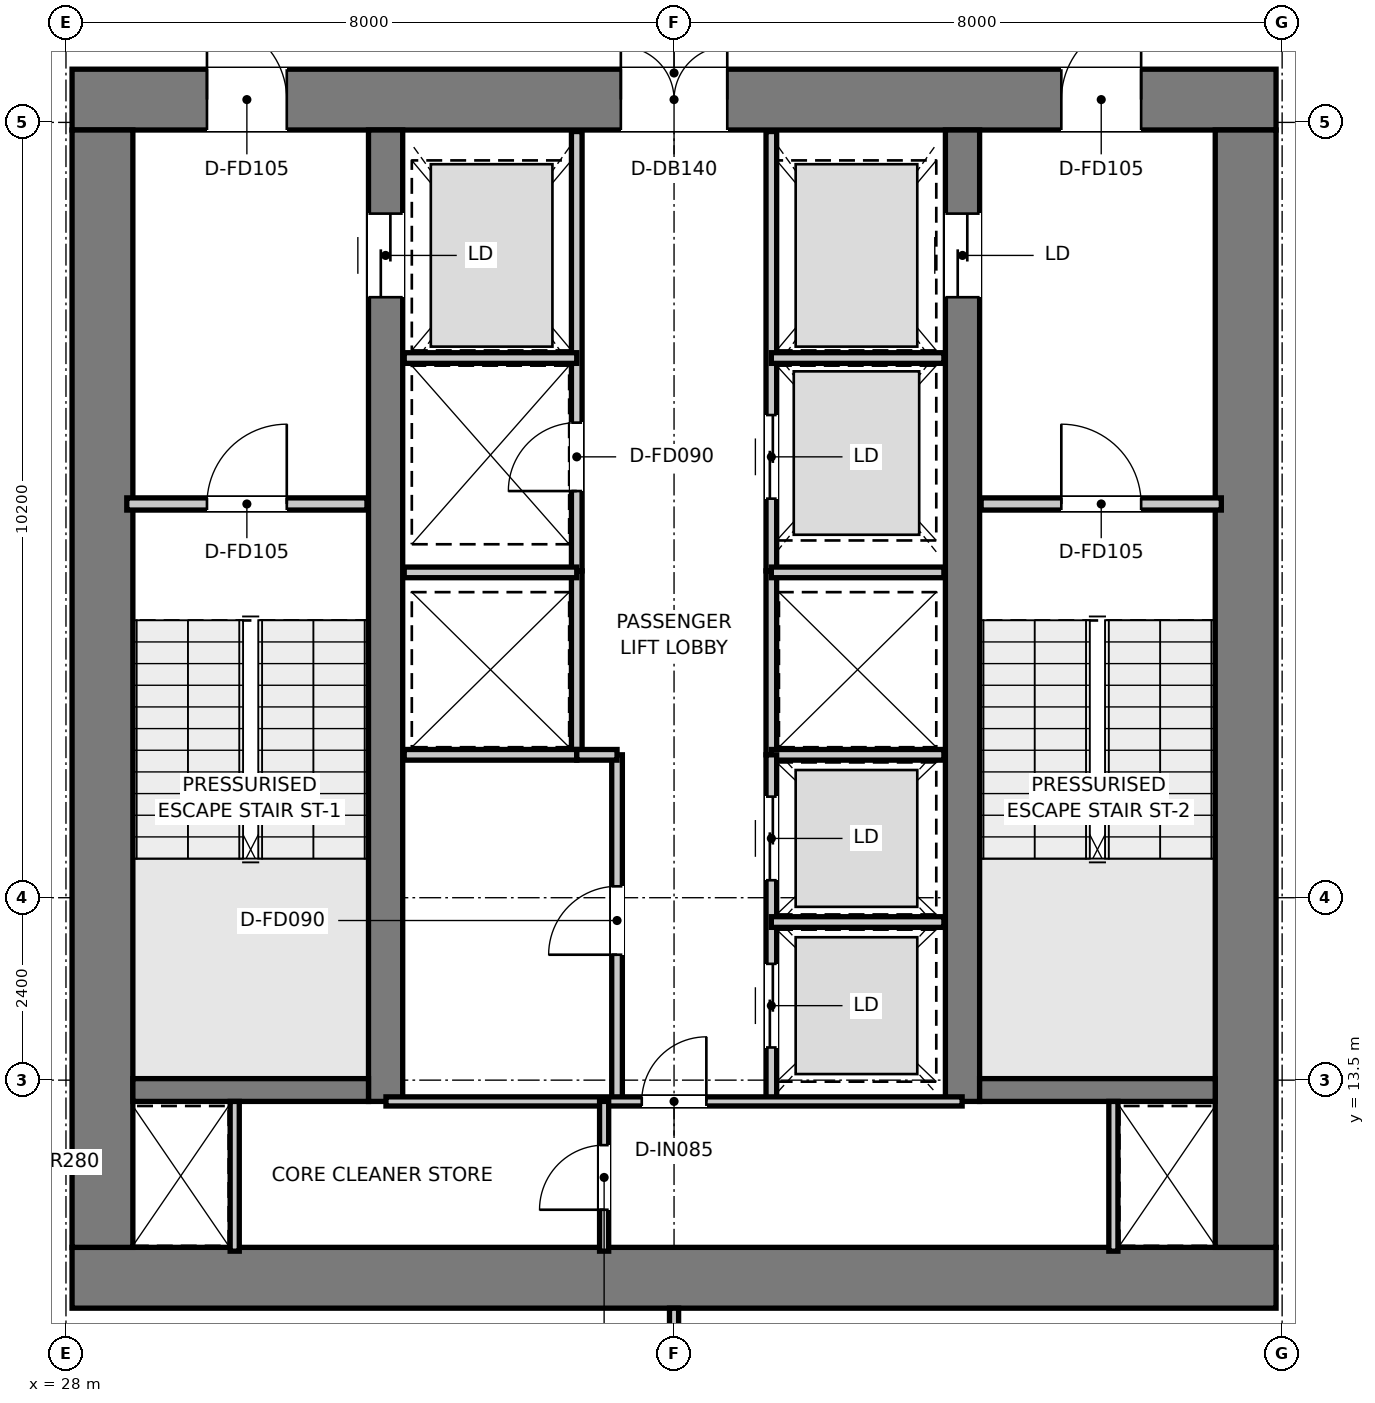
"""IFC4 building model, lengths in metres.
Left out: names, types, materials, properties, quantities, classifications, styles, units other than length and angle.
Written with IfcOpenShell. Run it as: python <this file> out.ifc"""

import sys

from ifc_helpers import new_model, si_unit, direction, frame, frame_2d, origin, place, context, subcontext, project, spatial, rectangle, extrude, element, fill, save


model = new_model("IFC4")
c1 = context("Model", 3, precision=1e-05, world=origin(), true_north=direction((0.0, 1.0)))
c2 = subcontext(c1, "Body", "Model", "MODEL_VIEW")
j1 = project(units=[si_unit("LENGTHUNIT", "METRE"), si_unit("PLANEANGLEUNIT", "RADIAN")], contexts=[c1])
p1 = place(None, origin())
s1 = spatial("IfcSite", under=j1, at=p1, CompositionType="ELEMENT")
p2 = place(p1, origin())
s2 = spatial("IfcBuilding", under=s1, at=p2, CompositionType="ELEMENT")
p3 = place(p2, frame((0.0, 0.0, 193.6)))
s3 = spatial("IfcBuildingStorey", under=s2, at=p3, CompositionType="ELEMENT", Elevation=193.6)
p4 = place(p3, frame((28.08, 10.9, 0.0), z_axis=(0.0, 0.0, 1.0), x_axis=(1.0, 0.0, 0.0)))
e1 = element("IfcWall", 1, at=p4, inside=s3, PredefinedType="SHEAR", context=c2, shape_type="SweptSolid", body=[
    extrude(rectangle(XDim=15.84, YDim=0.8, at=frame_2d((7.92, 0.0))), origin(), (0.0, 0.0, 1.0), 3.95),
])
p5 = place(p3, frame((28.08, 26.4, 0.0), z_axis=(0.0, 0.0, 1.0), x_axis=(1.0, 0.0, 0.0)))
e2 = element("IfcWall", 2, at=p5, inside=s3, PredefinedType="SHEAR", context=c2, shape_type="SweptSolid", body=[
    extrude(rectangle(XDim=15.84, YDim=0.8, at=frame_2d((7.92, 0.0))), origin(), (0.0, 0.0, 1.0), 3.95),
])
p6 = place(p5, frame((7.22, 0.0, 0.0)))
e3 = element("IfcOpeningElement", 3, at=p6, cuts=e2, PredefinedType="OPENING", context=c2, shape_type="SweptSolid", body=[
    extrude(rectangle(XDim=1.4, YDim=2.2, at=frame_2d((0.7, 1.1))), frame((0.0, 0.41, 0.0), z_axis=(0.0, -1.0, 0.0), x_axis=(1.0, 0.0, 0.0)), (0.0, 0.0, 1.0), 0.82),
])
p7 = place(p5, frame((1.775, 0.0, 0.0)))
e4 = element("IfcOpeningElement", 4, at=p7, cuts=e2, PredefinedType="OPENING", context=c2, shape_type="SweptSolid", body=[
    extrude(rectangle(XDim=1.05, YDim=2.1, at=frame_2d((0.525, 1.05))), frame((0.0, 0.41, 0.0), z_axis=(0.0, -1.0, 0.0), x_axis=(1.0, 0.0, 0.0)), (0.0, 0.0, 1.0), 0.82),
])
p8 = place(p5, frame((13.015, 0.0, 0.0)))
e5 = element("IfcOpeningElement", 5, at=p8, cuts=e2, PredefinedType="OPENING", context=c2, shape_type="SweptSolid", body=[
    extrude(rectangle(XDim=1.05, YDim=2.1, at=frame_2d((0.525, 1.05))), frame((0.0, 0.41, 0.0), z_axis=(0.0, -1.0, 0.0), x_axis=(1.0, 0.0, 0.0)), (0.0, 0.0, 1.0), 0.82),
])
for number, where, z_axis, x_axis in (
    (6, (28.48, 11.3, 0.0), (0.0, 0.0, 1.0), (0.0, 1.0, 0.0)),
    (7, (43.52, 11.3, 0.0), (0.0, 0.0, 1.0), (0.0, 1.0, 0.0)),
):
    element("IfcWall", number, at=place(p3, frame(where, z_axis=z_axis, x_axis=x_axis)), inside=s3, PredefinedType="SHEAR", context=c2, shape_type="SweptSolid", body=[
        extrude(rectangle(XDim=14.7, YDim=0.8, at=frame_2d((7.35, 0.0))), origin(), (0.0, 0.0, 1.0), 3.95),
    ])
p9 = place(p3, frame((32.205, 13.22, 0.0), z_axis=(0.0, 0.0, 1.0), x_axis=(0.0, 1.0, 0.0)))
e8 = element("IfcWall", 8, at=p9, inside=s3, PredefinedType="SHEAR", context=c2, shape_type="SweptSolid", body=[
    extrude(rectangle(XDim=12.78, YDim=0.45, at=frame_2d((6.39, 0.0))), origin(), (0.0, 0.0, 1.0), 3.95),
])
p10 = place(p9, frame((10.58, 0.0, 0.0)))
e9 = element("IfcOpeningElement", 9, at=p10, cuts=e8, PredefinedType="OPENING", context=c2, shape_type="SweptSolid", body=[
    extrude(rectangle(XDim=1.1, YDim=2.15, at=frame_2d((0.55, 1.075))), frame((0.0, 0.235, 0.0), z_axis=(0.0, -1.0, 0.0), x_axis=(1.0, 0.0, 0.0)), (0.0, 0.0, 1.0), 0.47),
])
p11 = place(p3, frame((39.795, 13.22, 0.0), z_axis=(0.0, 0.0, 1.0), x_axis=(0.0, 1.0, 0.0)))
e10 = element("IfcWall", 10, at=p11, inside=s3, PredefinedType="SHEAR", context=c2, shape_type="SweptSolid", body=[
    extrude(rectangle(XDim=12.78, YDim=0.45, at=frame_2d((6.39, 0.0))), origin(), (0.0, 0.0, 1.0), 3.95),
])
p12 = place(p11, frame((10.58, 0.0, 0.0)))
e11 = element("IfcOpeningElement", 11, at=p12, cuts=e10, PredefinedType="OPENING", context=c2, shape_type="SweptSolid", body=[
    extrude(rectangle(XDim=1.1, YDim=2.15, at=frame_2d((0.55, 1.075))), frame((0.0, 0.235, 0.0), z_axis=(0.0, -1.0, 0.0), x_axis=(1.0, 0.0, 0.0)), (0.0, 0.0, 1.0), 0.47),
])
for number, where, z_axis, x_axis in (
    (12, (28.88, 13.37, 0.0), (0.0, 0.0, 1.0), (1.0, 0.0, 0.0)),
    (13, (40.02, 13.37, 0.0), (0.0, 0.0, 1.0), (1.0, 0.0, 0.0)),
):
    element("IfcWall", number, at=place(p3, frame(where, z_axis=z_axis, x_axis=x_axis)), inside=s3, PredefinedType="SHEAR", context=c2, shape_type="SweptSolid", body=[
        extrude(rectangle(XDim=3.1, YDim=0.3, at=frame_2d((1.55, 0.0))), origin(), (0.0, 0.0, 1.0), 3.95),
    ])
p13 = place(p3, frame((28.8, 21.08, 0.0), z_axis=(0.0, 0.0, 1.0), x_axis=(1.0, 0.0, 0.0)))
e14 = element("IfcWall", 14, at=p13, inside=s3, PredefinedType="PARTITIONING", context=c2, shape_type="SweptSolid", body=[
    extrude(rectangle(XDim=3.16, YDim=0.16, at=frame_2d((1.58, 0.0))), origin(), (0.0, 0.0, 1.0), 3.67),
])
p14 = place(p13, frame((1.055, 0.0, 0.0)))
e15 = element("IfcOpeningElement", 15, at=p14, cuts=e14, PredefinedType="OPENING", context=c2, shape_type="SweptSolid", body=[
    extrude(rectangle(XDim=1.05, YDim=2.1, at=frame_2d((0.525, 1.05))), frame((0.0, 0.09, 0.0), z_axis=(0.0, -1.0, 0.0), x_axis=(1.0, 0.0, 0.0)), (0.0, 0.0, 1.0), 0.18),
])
p15 = place(p3, frame((40.04, 21.08, 0.0), z_axis=(0.0, 0.0, 1.0), x_axis=(1.0, 0.0, 0.0)))
e16 = element("IfcWall", 16, at=p15, inside=s3, PredefinedType="PARTITIONING", context=c2, shape_type="SweptSolid", body=[
    extrude(rectangle(XDim=3.16, YDim=0.16, at=frame_2d((1.58, 0.0))), origin(), (0.0, 0.0, 1.0), 3.67),
])
p16 = place(p15, frame((1.055, 0.0, 0.0)))
e17 = element("IfcOpeningElement", 17, at=p16, cuts=e16, PredefinedType="OPENING", context=c2, shape_type="SweptSolid", body=[
    extrude(rectangle(XDim=1.05, YDim=2.1, at=frame_2d((0.525, 1.05))), frame((0.0, 0.09, 0.0), z_axis=(0.0, -1.0, 0.0), x_axis=(1.0, 0.0, 0.0)), (0.0, 0.0, 1.0), 0.18),
])
p17 = place(p3, frame((34.72, 20.2, 0.0), z_axis=(0.0, 0.0, 1.0), x_axis=(0.0, 1.0, 0.0)))
e18 = element("IfcWall", 18, at=p17, inside=s3, PredefinedType="PARTITIONING", context=c2, shape_type="SweptSolid", body=[
    extrude(rectangle(XDim=5.78, YDim=0.14, at=frame_2d((2.89, 0.0))), origin(), (0.0, 0.0, 1.0), 2.67),
])
p18 = place(p17, frame((1.05, 0.0, 0.0)))
e19 = element("IfcOpeningElement", 19, at=p18, cuts=e18, PredefinedType="OPENING", context=c2, shape_type="SweptSolid", body=[
    extrude(rectangle(XDim=0.9, YDim=2.1, at=frame_2d((0.45, 1.05))), frame((0.0, 0.08, 0.0), z_axis=(0.0, -1.0, 0.0), x_axis=(1.0, 0.0, 0.0)), (0.0, 0.0, 1.0), 0.16),
])
p19 = place(p3, frame((37.28, 20.2, 0.0), z_axis=(0.0, 0.0, 1.0), x_axis=(0.0, 1.0, 0.0)))
e20 = element("IfcWall", 20, at=p19, inside=s3, PredefinedType="PARTITIONING", context=c2, shape_type="SweptSolid", body=[
    extrude(rectangle(XDim=5.78, YDim=0.14, at=frame_2d((2.89, 0.0))), origin(), (0.0, 0.0, 1.0), 2.67),
])
p20 = place(p19, frame((0.95, 0.0, 0.0)))
e21 = element("IfcOpeningElement", 21, at=p20, cuts=e20, PredefinedType="OPENING", context=c2, shape_type="SweptSolid", body=[
    extrude(rectangle(XDim=1.1, YDim=2.15, at=frame_2d((0.55, 1.075))), frame((0.0, 0.08, 0.0), z_axis=(0.0, -1.0, 0.0), x_axis=(1.0, 0.0, 0.0)), (0.0, 0.0, 1.0), 0.16),
])
for number, where, z_axis, x_axis in (
    (22, (32.45, 23.0, 0.0), (0.0, 0.0, 1.0), (1.0, 0.0, 0.0)),
    (23, (37.28, 23.0, 0.0), (0.0, 0.0, 1.0), (1.0, 0.0, 0.0)),
):
    element("IfcWall", number, at=place(p3, frame(where, z_axis=z_axis, x_axis=x_axis)), inside=s3, PredefinedType="PARTITIONING", context=c2, shape_type="SweptSolid", body=[
        extrude(rectangle(XDim=2.27, YDim=0.14, at=frame_2d((1.135, 0.0))), origin(), (0.0, 0.0, 1.0), 2.67),
    ])
for number, where, z_axis, x_axis in (
    (24, (34.72, 17.78, 0.0), (0.0, 0.0, 1.0), (0.0, 1.0, 0.0)),
    (25, (37.28, 17.78, 0.0), (0.0, 0.0, 1.0), (0.0, 1.0, 0.0)),
):
    element("IfcWall", number, at=place(p3, frame(where, z_axis=z_axis, x_axis=x_axis)), inside=s3, PredefinedType="PARTITIONING", context=c2, shape_type="SweptSolid", body=[
        extrude(rectangle(XDim=2.42, YDim=0.14, at=frame_2d((1.21, 0.0))), origin(), (0.0, 0.0, 1.0), 3.67),
    ])
for number, where, z_axis, x_axis in (
    (26, (32.45, 17.78, 0.0), (0.0, 0.0, 1.0), (1.0, 0.0, 0.0)),
    (27, (32.45, 20.18, 0.0), (0.0, 0.0, 1.0), (1.0, 0.0, 0.0)),
    (28, (37.28, 17.78, 0.0), (0.0, 0.0, 1.0), (1.0, 0.0, 0.0)),
    (29, (37.28, 20.18, 0.0), (0.0, 0.0, 1.0), (1.0, 0.0, 0.0)),
):
    element("IfcWall", number, at=place(p3, frame(where, z_axis=z_axis, x_axis=x_axis)), inside=s3, PredefinedType="PARTITIONING", context=c2, shape_type="SweptSolid", body=[
        extrude(rectangle(XDim=2.27, YDim=0.14, at=frame_2d((1.135, 0.0))), origin(), (0.0, 0.0, 1.0), 3.67),
    ])
p21 = place(p3, frame((35.25, 13.22, 0.0), z_axis=(0.0, 0.0, 1.0), x_axis=(0.0, 1.0, 0.0)))
e30 = element("IfcWall", 30, at=p21, inside=s3, PredefinedType="PARTITIONING", context=c2, shape_type="SweptSolid", body=[
    extrude(rectangle(XDim=4.56, YDim=0.14, at=frame_2d((2.28, 0.0))), origin(), (0.0, 0.0, 1.0), 3.67),
])
p22 = place(p21, frame((1.93, 0.0, 0.0)))
e31 = element("IfcOpeningElement", 31, at=p22, cuts=e30, PredefinedType="OPENING", context=c2, shape_type="SweptSolid", body=[
    extrude(rectangle(XDim=0.9, YDim=2.1, at=frame_2d((0.45, 1.05))), frame((0.0, 0.08, 0.0), z_axis=(0.0, -1.0, 0.0), x_axis=(1.0, 0.0, 0.0)), (0.0, 0.0, 1.0), 0.16),
])
p23 = place(p3, frame((34.72, 17.78, 0.0), z_axis=(0.0, 0.0, 1.0), x_axis=(1.0, 0.0, 0.0)))
e32 = element("IfcWall", 32, at=p23, inside=s3, PredefinedType="PARTITIONING", context=c2, shape_type="SweptSolid", body=[
    extrude(rectangle(XDim=0.53, YDim=0.14, at=frame_2d((0.265, 0.0))), origin(), (0.0, 0.0, 1.0), 3.67),
])
p24 = place(p3, frame((37.28, 13.22, 0.0), z_axis=(0.0, 0.0, 1.0), x_axis=(0.0, 1.0, 0.0)))
e33 = element("IfcWall", 33, at=p24, inside=s3, PredefinedType="PARTITIONING", context=c2, shape_type="SweptSolid", body=[
    extrude(rectangle(XDim=4.56, YDim=0.14, at=frame_2d((2.28, 0.0))), origin(), (0.0, 0.0, 1.0), 3.67),
])
p25 = place(p24, frame((0.71, 0.0, 0.0)))
e34 = element("IfcOpeningElement", 34, at=p25, cuts=e33, PredefinedType="OPENING", context=c2, shape_type="SweptSolid", body=[
    extrude(rectangle(XDim=1.1, YDim=2.15, at=frame_2d((0.55, 1.075))), frame((0.0, 0.08, 0.0), z_axis=(0.0, -1.0, 0.0), x_axis=(1.0, 0.0, 0.0)), (0.0, 0.0, 1.0), 0.16),
])
p26 = place(p24, frame((2.91, 0.0, 0.0)))
e35 = element("IfcOpeningElement", 35, at=p26, cuts=e33, PredefinedType="OPENING", context=c2, shape_type="SweptSolid", body=[
    extrude(rectangle(XDim=1.1, YDim=2.15, at=frame_2d((0.55, 1.075))), frame((0.0, 0.08, 0.0), z_axis=(0.0, -1.0, 0.0), x_axis=(1.0, 0.0, 0.0)), (0.0, 0.0, 1.0), 0.16),
])
p27 = place(p3, frame((37.28, 15.58, 0.0), z_axis=(0.0, 0.0, 1.0), x_axis=(1.0, 0.0, 0.0)))
e36 = element("IfcWall", 36, at=p27, inside=s3, PredefinedType="PARTITIONING", context=c2, shape_type="SweptSolid", body=[
    extrude(rectangle(XDim=2.27, YDim=0.14, at=frame_2d((1.135, 0.0))), origin(), (0.0, 0.0, 1.0), 3.67),
])
for number, where, z_axis, x_axis in (
    (37, (30.22, 11.25, 0.0), (0.0, 0.0, 1.0), (0.0, 1.0, 0.0)),
    (38, (41.78, 11.25, 0.0), (0.0, 0.0, 1.0), (0.0, 1.0, 0.0)),
):
    element("IfcWall", number, at=place(p3, frame(where, z_axis=z_axis, x_axis=x_axis)), inside=s3, PredefinedType="PARTITIONING", context=c2, shape_type="SweptSolid", body=[
        extrude(rectangle(XDim=1.97, YDim=0.12, at=frame_2d((0.985, 0.0))), origin(), (0.0, 0.0, 1.0), 3.67),
    ])
p28 = place(p3, frame((32.21, 13.22, 0.0), z_axis=(0.0, 0.0, 1.0), x_axis=(1.0, 0.0, 0.0)))
e39 = element("IfcWall", 39, at=p28, inside=s3, PredefinedType="PARTITIONING", context=c2, shape_type="SweptSolid", body=[
    extrude(rectangle(XDim=7.58, YDim=0.12, at=frame_2d((3.79, 0.0))), origin(), (0.0, 0.0, 1.0), 3.67),
])
p29 = place(p28, frame((3.365, 0.0, 0.0)))
e40 = element("IfcOpeningElement", 40, at=p29, cuts=e39, PredefinedType="OPENING", context=c2, shape_type="SweptSolid", body=[
    extrude(rectangle(XDim=0.85, YDim=2.1, at=frame_2d((0.425, 1.05))), frame((0.0, 0.07, 0.0), z_axis=(0.0, -1.0, 0.0), x_axis=(1.0, 0.0, 0.0)), (0.0, 0.0, 1.0), 0.14),
])
p30 = place(p3, frame((35.08, 11.25, 0.0), z_axis=(0.0, 0.0, 1.0), x_axis=(0.0, 1.0, 0.0)))
e41 = element("IfcWall", 41, at=p30, inside=s3, PredefinedType="PARTITIONING", context=c2, shape_type="SweptSolid", body=[
    extrude(rectangle(XDim=1.97, YDim=0.12, at=frame_2d((0.985, 0.0))), origin(), (0.0, 0.0, 1.0), 3.67),
])
p31 = place(p30, frame((0.545, 0.0, 0.0)))
e42 = element("IfcOpeningElement", 42, at=p31, cuts=e41, PredefinedType="OPENING", context=c2, shape_type="SweptSolid", body=[
    extrude(rectangle(XDim=0.85, YDim=2.1, at=frame_2d((0.425, 1.05))), frame((0.0, 0.07, 0.0), z_axis=(0.0, -1.0, 0.0), x_axis=(1.0, 0.0, 0.0)), (0.0, 0.0, 1.0), 0.14),
])
p32 = place(p3, frame((36.0, -0.302, 0.0), z_axis=(0.0, 0.0, 1.0), x_axis=(0.0, 1.0, 0.0)))
e43 = element("IfcWall", 43, at=p32, inside=s3, PredefinedType="PARTITIONING", context=c2, shape_type="SweptSolid", body=[
    extrude(rectangle(XDim=10.802, YDim=0.12, at=frame_2d((5.401, 0.0))), origin(), (0.0, 0.0, 1.0), 3.67),
])
p33 = place(p14, origin())
e44 = element("IfcDoor", 44, at=p33, inside=s3, OperationType="SINGLE_SWING_RIGHT", PredefinedType="DOOR", context=c2, shape_type="SweptSolid", body=[
    extrude(rectangle(XDim=1.05, YDim=2.1, at=frame_2d((0.525, 1.05))), frame((0.0, 0.025, 0.0), z_axis=(0.0, -1.0, 0.0), x_axis=(1.0, 0.0, 0.0)), (0.0, 0.0, 1.0), 0.05),
])
fill(e15, e44)
p34 = place(p16, origin())
e45 = element("IfcDoor", 45, at=p34, inside=s3, OperationType="SINGLE_SWING_LEFT", PredefinedType="DOOR", context=c2, shape_type="SweptSolid", body=[
    extrude(rectangle(XDim=1.05, YDim=2.1, at=frame_2d((0.525, 1.05))), frame((0.0, 0.025, 0.0), z_axis=(0.0, -1.0, 0.0), x_axis=(1.0, 0.0, 0.0)), (0.0, 0.0, 1.0), 0.05),
])
fill(e17, e45)
p35 = place(p6, origin())
e46 = element("IfcDoor", 46, at=p35, inside=s3, OperationType="DOUBLE_DOOR_SINGLE_SWING", PredefinedType="DOOR", context=c2, shape_type="SweptSolid", body=[
    extrude(rectangle(XDim=1.4, YDim=2.2, at=frame_2d((0.7, 1.1))), frame((0.0, 0.025, 0.0), z_axis=(0.0, -1.0, 0.0), x_axis=(1.0, 0.0, 0.0)), (0.0, 0.0, 1.0), 0.05),
])
fill(e3, e46)
p36 = place(p7, origin())
e47 = element("IfcDoor", 47, at=p36, inside=s3, OperationType="SINGLE_SWING_LEFT", PredefinedType="DOOR", context=c2, shape_type="SweptSolid", body=[
    extrude(rectangle(XDim=1.05, YDim=2.1, at=frame_2d((0.525, 1.05))), frame((0.0, 0.025, 0.0), z_axis=(0.0, -1.0, 0.0), x_axis=(1.0, 0.0, 0.0)), (0.0, 0.0, 1.0), 0.05),
])
fill(e4, e47)
p37 = place(p8, origin())
e48 = element("IfcDoor", 48, at=p37, inside=s3, OperationType="SINGLE_SWING_RIGHT", PredefinedType="DOOR", context=c2, shape_type="SweptSolid", body=[
    extrude(rectangle(XDim=1.05, YDim=2.1, at=frame_2d((0.525, 1.05))), frame((0.0, 0.025, 0.0), z_axis=(0.0, -1.0, 0.0), x_axis=(1.0, 0.0, 0.0)), (0.0, 0.0, 1.0), 0.05),
])
fill(e5, e48)
p38 = place(p10, origin())
e49 = element("IfcDoor", 49, at=p38, inside=s3, OperationType="DOUBLE_DOOR_SLIDING", PredefinedType="DOOR", context=c2, shape_type="SweptSolid", body=[
    extrude(rectangle(XDim=1.1, YDim=2.15, at=frame_2d((0.55, 1.075))), frame((0.0, 0.025, 0.0), z_axis=(0.0, -1.0, 0.0), x_axis=(1.0, 0.0, 0.0)), (0.0, 0.0, 1.0), 0.05),
])
fill(e9, e49)
p39 = place(p12, origin())
e50 = element("IfcDoor", 50, at=p39, inside=s3, OperationType="DOUBLE_DOOR_SLIDING", PredefinedType="DOOR", context=c2, shape_type="SweptSolid", body=[
    extrude(rectangle(XDim=1.1, YDim=2.15, at=frame_2d((0.55, 1.075))), frame((0.0, 0.025, 0.0), z_axis=(0.0, -1.0, 0.0), x_axis=(1.0, 0.0, 0.0)), (0.0, 0.0, 1.0), 0.05),
])
fill(e11, e50)
p40 = place(p18, origin())
e51 = element("IfcDoor", 51, at=p40, inside=s3, OperationType="SINGLE_SWING_LEFT", PredefinedType="DOOR", context=c2, shape_type="SweptSolid", body=[
    extrude(rectangle(XDim=0.9, YDim=2.1, at=frame_2d((0.45, 1.05))), frame((0.0, 0.025, 0.0), z_axis=(0.0, -1.0, 0.0), x_axis=(1.0, 0.0, 0.0)), (0.0, 0.0, 1.0), 0.05),
])
fill(e19, e51)
p41 = place(p20, origin())
e52 = element("IfcDoor", 52, at=p41, inside=s3, OperationType="DOUBLE_DOOR_SLIDING", PredefinedType="DOOR", context=c2, shape_type="SweptSolid", body=[
    extrude(rectangle(XDim=1.1, YDim=2.15, at=frame_2d((0.55, 1.075))), frame((0.0, 0.025, 0.0), z_axis=(0.0, -1.0, 0.0), x_axis=(1.0, 0.0, 0.0)), (0.0, 0.0, 1.0), 0.05),
])
fill(e21, e52)
p42 = place(p22, origin())
e53 = element("IfcDoor", 53, at=p42, inside=s3, OperationType="SINGLE_SWING_LEFT", PredefinedType="DOOR", context=c2, shape_type="SweptSolid", body=[
    extrude(rectangle(XDim=0.9, YDim=2.1, at=frame_2d((0.45, 1.05))), frame((0.0, 0.025, 0.0), z_axis=(0.0, -1.0, 0.0), x_axis=(1.0, 0.0, 0.0)), (0.0, 0.0, 1.0), 0.05),
])
fill(e31, e53)
p43 = place(p25, origin())
e54 = element("IfcDoor", 54, at=p43, inside=s3, OperationType="DOUBLE_DOOR_SLIDING", PredefinedType="DOOR", context=c2, shape_type="SweptSolid", body=[
    extrude(rectangle(XDim=1.1, YDim=2.15, at=frame_2d((0.55, 1.075))), frame((0.0, 0.025, 0.0), z_axis=(0.0, -1.0, 0.0), x_axis=(1.0, 0.0, 0.0)), (0.0, 0.0, 1.0), 0.05),
])
fill(e34, e54)
p44 = place(p26, origin())
e55 = element("IfcDoor", 55, at=p44, inside=s3, OperationType="DOUBLE_DOOR_SLIDING", PredefinedType="DOOR", context=c2, shape_type="SweptSolid", body=[
    extrude(rectangle(XDim=1.1, YDim=2.15, at=frame_2d((0.55, 1.075))), frame((0.0, 0.025, 0.0), z_axis=(0.0, -1.0, 0.0), x_axis=(1.0, 0.0, 0.0)), (0.0, 0.0, 1.0), 0.05),
])
fill(e35, e55)
p45 = place(p29, origin())
e56 = element("IfcDoor", 56, at=p45, inside=s3, OperationType="SINGLE_SWING_RIGHT", PredefinedType="DOOR", context=c2, shape_type="SweptSolid", body=[
    extrude(rectangle(XDim=0.85, YDim=2.1, at=frame_2d((0.425, 1.05))), frame((0.0, 0.025, 0.0), z_axis=(0.0, -1.0, 0.0), x_axis=(1.0, 0.0, 0.0)), (0.0, 0.0, 1.0), 0.05),
])
fill(e40, e56)
p46 = place(p31, origin())
e57 = element("IfcDoor", 57, at=p46, inside=s3, OperationType="SINGLE_SWING_LEFT", PredefinedType="DOOR", context=c2, shape_type="SweptSolid", body=[
    extrude(rectangle(XDim=0.85, YDim=2.1, at=frame_2d((0.425, 1.05))), frame((0.0, 0.025, 0.0), z_axis=(0.0, -1.0, 0.0), x_axis=(1.0, 0.0, 0.0)), (0.0, 0.0, 1.0), 0.05),
])
fill(e42, e57)
save(model, sys.argv[1])
